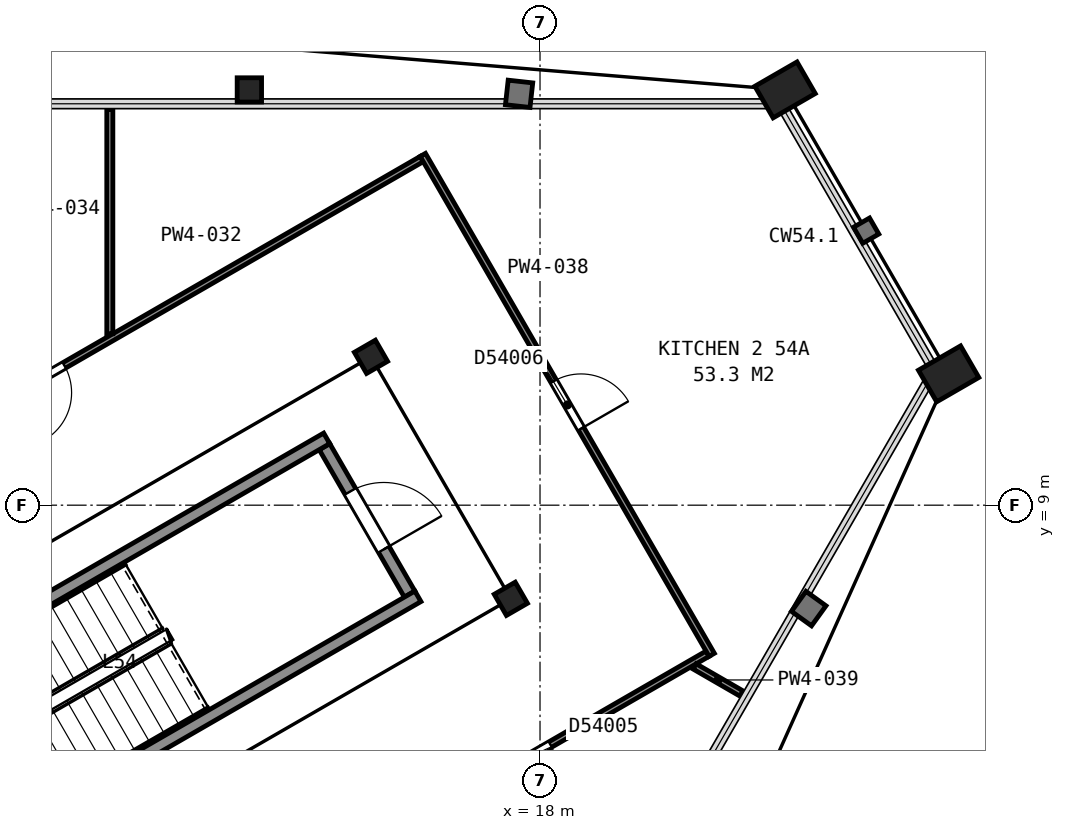
"""IFC4 building model, lengths in metres.
Left out: names, types, materials, properties, quantities, classifications, styles, units other than length and angle.
Written with IfcOpenShell. Run it as: python <this file> out.ifc"""

import sys

from ifc_helpers import new_model, si_unit, direction, frame, frame_2d, origin, origin_2d, place, context, subcontext, project, spatial, rectangle, hollow_rectangle, i_section, extrude, element, fill, save


model = new_model("IFC4")
c1 = context("Model", 3, precision=1e-05, world=origin(), true_north=direction((0.0, 1.0)))
c2 = subcontext(c1, "Body", "Model", "MODEL_VIEW")
j1 = project(units=[si_unit("LENGTHUNIT", "METRE"), si_unit("PLANEANGLEUNIT", "RADIAN")], contexts=[c1])
p1 = place(None, origin())
s1 = spatial("IfcSite", under=j1, at=p1, CompositionType="ELEMENT")
p2 = place(p1, origin())
s2 = spatial("IfcBuilding", under=s1, at=p2, CompositionType="ELEMENT")
p3 = place(p2, frame((0.0, 0.0, 217.5)))
s3 = spatial("IfcBuildingStorey", under=s2, at=p3, CompositionType="ELEMENT", Elevation=217.5)
p4 = place(p3, frame((22.03, 15.83, 0.065), z_axis=(0.0, 0.0, 1.0), x_axis=(0.5, -0.866025403784, 0.0)))
e1 = element("IfcColumn", 1, at=p4, inside=s3, PredefinedType="COLUMN", context=c2, shape_type="SweptSolid", body=[
    extrude(hollow_rectangle(XDim=0.6, YDim=0.8, WallThickness=0.05, at=origin_2d()), origin(), (0.0, 0.0, 1.0), 3.635),
])
p5 = place(p3, frame((13.22, 15.83, 0.04), z_axis=(0.0, 0.0, 1.0), x_axis=(1.0, 0.0, 0.0)))
e2 = element("IfcColumn", 2, at=p5, inside=s3, PredefinedType="COLUMN", context=c2, shape_type="SweptSolid", body=[
    extrude(i_section(OverallWidth=0.401, OverallDepth=0.399, WebThickness=0.025, FlangeThickness=0.04, FilletRadius=0.015, at=origin_2d()), origin(), (0.0, 0.0, 1.0), 3.66),
])
p6 = place(p3, frame((24.72, 11.16, 0.065), z_axis=(0.0, 0.0, 1.0), x_axis=(0.5, -0.866025403784, 0.0)))
e3 = element("IfcColumn", 3, at=p6, inside=s3, PredefinedType="COLUMN", context=c2, shape_type="SweptSolid", body=[
    extrude(hollow_rectangle(XDim=0.6, YDim=0.8, WallThickness=0.05, at=origin_2d()), origin(), (0.0, 0.0, 1.0), 3.635),
])
for number, where, z_axis, x_axis in (
    (4, (17.52, 7.46, 0.0), (0.0, 0.0, 1.0), (0.5, -0.866, 0.0)),
    (5, (15.22, 11.44, 0.0), (0.0, 0.0, 1.0), (0.5, -0.866, 0.0)),
):
    element("IfcColumn", number, at=place(p3, frame(where, z_axis=z_axis, x_axis=x_axis)), inside=s3, PredefinedType="COLUMN", context=c2, shape_type="SweptSolid", body=[
        extrude(i_section(OverallWidth=0.401, OverallDepth=0.399, WebThickness=0.025, FlangeThickness=0.04, FilletRadius=0.015, at=origin_2d()), origin(), (0.0, 0.0, 1.0), 3.7),
    ])
p7 = place(p3, frame((15.855, 7.538, 0.0), z_axis=(0.0, 0.0, 1.0), x_axis=(-0.500049511043, 0.865996816683, 0.0)))
e6 = element("IfcWall", 6, at=p7, inside=s3, PredefinedType="PARTITIONING", context=c2, shape_type="SweptSolid", body=[
    extrude(rectangle(XDim=2.8, YDim=0.2, at=frame_2d((1.4, 0.0))), origin(), (0.0, 0.0, 1.0), 3.45),
])
p8 = place(p7, frame((0.85, 0.0, 0.0)))
e7 = element("IfcOpeningElement", 7, at=p8, cuts=e6, PredefinedType="OPENING", context=c2, shape_type="SweptSolid", body=[
    extrude(rectangle(XDim=1.1, YDim=2.1, at=frame_2d((0.55, 1.05))), frame((0.0, 0.11, 0.0), z_axis=(0.0, -1.0, 0.0), x_axis=(1.0, 0.0, 0.0)), (0.0, 0.0, 1.0), 0.22),
])
for number, where, z_axis, x_axis in (
    (8, (6.178, 5.299, 0.0), (0.0, 0.0, 1.0), (0.866, 0.5, 0.0)),
    (9, (7.678, 2.701, 0.0), (0.0, 0.0, 1.0), (0.866, 0.5, 0.0)),
):
    element("IfcWall", number, at=place(p3, frame(where, z_axis=z_axis, x_axis=x_axis)), inside=s3, PredefinedType="PARTITIONING", context=c2, shape_type="SweptSolid", body=[
        extrude(rectangle(XDim=9.6, YDim=0.2, at=frame_2d((4.8, 0.0))), origin(), (0.0, 0.0, 1.0), 3.45),
    ])
p9 = place(p3, frame((8.691, 10.442, 0.0), z_axis=(0.0, 0.0, 1.0), x_axis=(0.866070360466, 0.499922124658, 0.0)))
e10 = element("IfcWall", 10, at=p9, inside=s3, PredefinedType="PARTITIONING", context=c2, shape_type="SweptSolid", body=[
    extrude(rectangle(XDim=8.503, YDim=0.1, at=frame_2d((4.251, 0.0))), origin(), (0.0, 0.0, 1.0), 2.713),
])
p10 = place(p9, frame((0.815, 0.0, 0.0)))
e11 = element("IfcOpeningElement", 11, at=p10, cuts=e10, PredefinedType="OPENING", context=c2, shape_type="SweptSolid", body=[
    extrude(rectangle(XDim=0.9, YDim=2.1, at=frame_2d((0.45, 1.05))), frame((0.0, 0.06, 0.0), z_axis=(0.0, -1.0, 0.0), x_axis=(1.0, 0.0, 0.0)), (0.0, 0.0, 1.0), 0.12),
])
p11 = place(p3, frame((10.925, 11.819, 0.0), z_axis=(0.0, 0.0, 1.0), x_axis=(0.0, 1.0, 0.0)))
e12 = element("IfcWall", 12, at=p11, inside=s3, PredefinedType="PARTITIONING", context=c2, shape_type="SweptSolid", body=[
    extrude(rectangle(XDim=3.688, YDim=0.1, at=frame_2d((1.844, 0.0))), origin(), (0.0, 0.0, 1.0), 2.713),
])
p12 = place(p3, frame((20.756, 6.557, 0.0), z_axis=(0.0, 0.0, 1.0), x_axis=(-0.866069146081, -0.499924228466, 0.0)))
e13 = element("IfcWall", 13, at=p12, inside=s3, PredefinedType="PARTITIONING", context=c2, shape_type="SweptSolid", body=[
    extrude(rectangle(XDim=8.519, YDim=0.1, at=frame_2d((4.259, 0.0))), origin(), (0.0, 0.0, 1.0), 2.713),
])
p13 = place(p12, frame((2.986, 0.0, 0.0)))
e14 = element("IfcOpeningElement", 14, at=p13, cuts=e13, PredefinedType="OPENING", context=c2, shape_type="SweptSolid", body=[
    extrude(rectangle(XDim=0.9, YDim=2.1, at=frame_2d((0.45, 1.05))), frame((0.0, 0.06, 0.0), z_axis=(0.0, -1.0, 0.0), x_axis=(1.0, 0.0, 0.0)), (0.0, 0.0, 1.0), 0.12),
])
p14 = place(p3, frame((16.073, 14.761, 0.0), z_axis=(0.0, 0.0, 1.0), x_axis=(0.500297300687, -0.865853689098, 0.0)))
e15 = element("IfcWall", 15, at=p14, inside=s3, PredefinedType="PARTITIONING", context=c2, shape_type="SweptSolid", body=[
    extrude(rectangle(XDim=9.496, YDim=0.1, at=frame_2d((4.748, 0.0))), origin(), (0.0, 0.0, 1.0), 2.713),
])
p15 = place(p14, frame((4.3, 0.0, 0.0)))
e16 = element("IfcOpeningElement", 16, at=p15, cuts=e15, PredefinedType="OPENING", context=c2, shape_type="SweptSolid", body=[
    extrude(rectangle(XDim=0.9, YDim=2.1, at=frame_2d((0.45, 1.05))), frame((0.0, 0.06, 0.0), z_axis=(0.0, -1.0, 0.0), x_axis=(1.0, 0.0, 0.0)), (0.0, 0.0, 1.0), 0.12),
])
p16 = place(p3, frame((20.543, 6.348, 0.0), z_axis=(0.0, 0.0, 1.0), x_axis=(0.865952303503, -0.500126592033, 0.0)))
e17 = element("IfcWall", 17, at=p16, inside=s3, PredefinedType="PARTITIONING", context=c2, shape_type="SweptSolid", body=[
    extrude(rectangle(XDim=0.889, YDim=0.1, at=frame_2d((0.444, 0.0))), origin(), (0.0, 0.0, 1.0), 2.713),
])
p17 = place(p8, origin())
e18 = element("IfcDoor", 18, at=p17, inside=s3, OperationType="SINGLE_SWING_LEFT", PredefinedType="DOOR", context=c2, shape_type="SweptSolid", body=[
    extrude(rectangle(XDim=1.1, YDim=2.1, at=frame_2d((0.55, 1.05))), frame((0.0, 0.025, 0.0), z_axis=(0.0, -1.0, 0.0), x_axis=(1.0, 0.0, 0.0)), (0.0, 0.0, 1.0), 0.05),
])
fill(e7, e18)
p18 = place(p10, origin())
e19 = element("IfcDoor", 19, at=p18, inside=s3, OperationType="SINGLE_SWING_LEFT", PredefinedType="DOOR", context=c2, shape_type="SweptSolid", body=[
    extrude(rectangle(XDim=0.9, YDim=2.1, at=frame_2d((0.45, 1.05))), frame((0.0, 0.025, 0.0), z_axis=(0.0, -1.0, 0.0), x_axis=(1.0, 0.0, 0.0)), (0.0, 0.0, 1.0), 0.05),
])
fill(e11, e19)
p19 = place(p13, origin())
e20 = element("IfcDoor", 20, at=p19, inside=s3, OperationType="SINGLE_SWING_RIGHT", PredefinedType="DOOR", context=c2, shape_type="SweptSolid", body=[
    extrude(rectangle(XDim=0.9, YDim=2.1, at=frame_2d((0.45, 1.05))), frame((0.0, 0.025, 0.0), z_axis=(0.0, -1.0, 0.0), x_axis=(1.0, 0.0, 0.0)), (0.0, 0.0, 1.0), 0.05),
])
fill(e14, e20)
p20 = place(p15, origin())
e21 = element("IfcDoor", 21, at=p20, inside=s3, OperationType="SINGLE_SWING_RIGHT", PredefinedType="DOOR", context=c2, shape_type="SweptSolid", body=[
    extrude(rectangle(XDim=0.9, YDim=2.1, at=frame_2d((0.45, 1.05))), frame((0.0, 0.025, 0.0), z_axis=(0.0, -1.0, 0.0), x_axis=(1.0, 0.0, 0.0)), (0.0, 0.0, 1.0), 0.05),
])
fill(e16, e21)
save(model, sys.argv[1])
